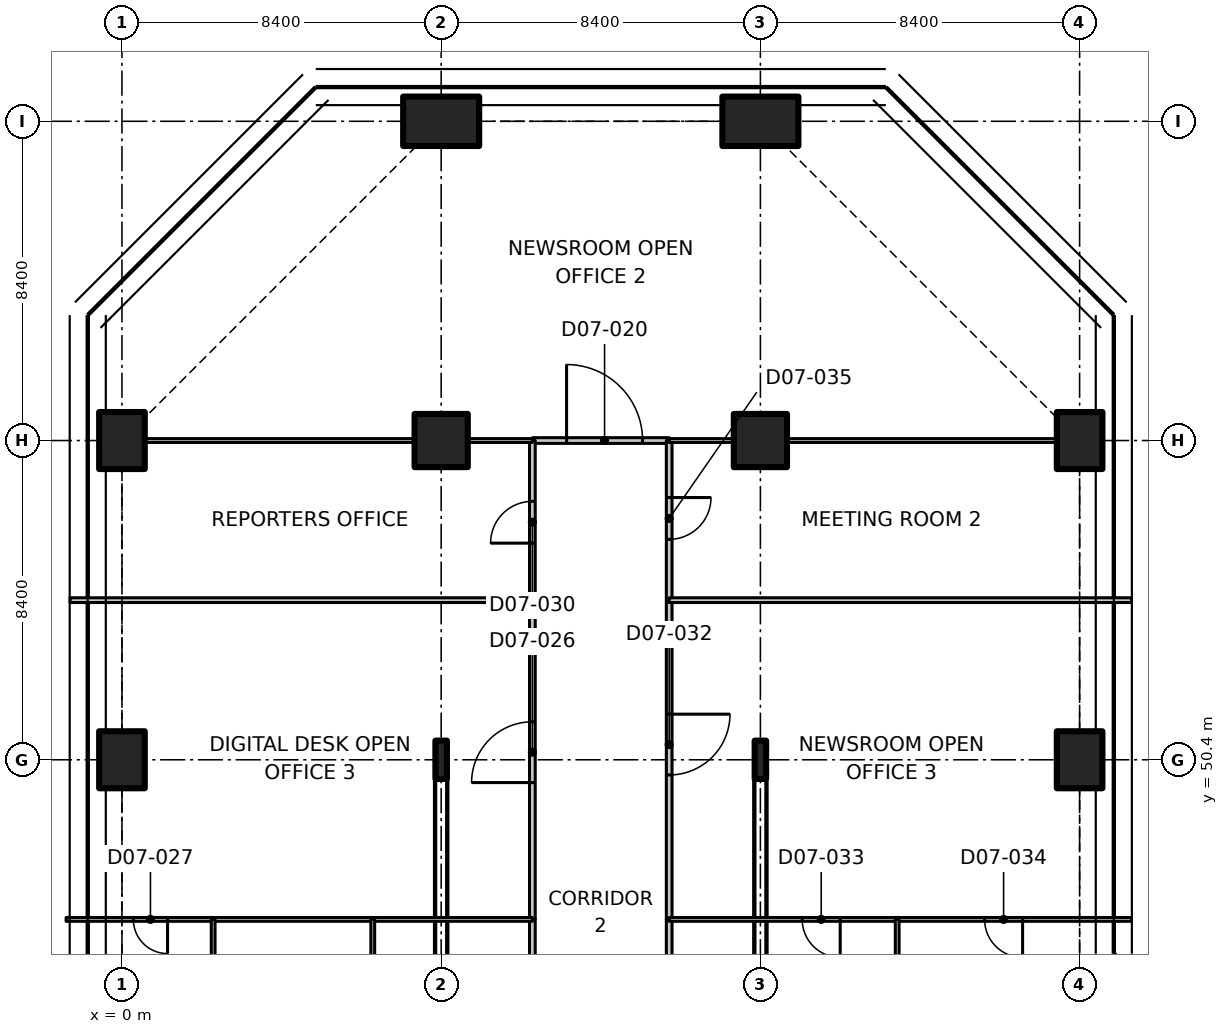
"""IFC4 building model, lengths in metres.
Left out: names, types, materials, properties, quantities, classifications, styles, units other than length and angle.
Written with IfcOpenShell. Run it as: python <this file> out.ifc"""

import sys

from ifc_helpers import new_model, si_unit, direction, frame, frame_2d, origin, origin_2d, place, context, subcontext, project, spatial, polyline, rectangle, i_section, outline, extrude, element, fill, save


model = new_model("IFC4")
c1 = context("Model", 3, precision=1e-05, world=origin(), true_north=direction((0.0, 1.0)))
c2 = subcontext(c1, "Body", "Model", "MODEL_VIEW")
j1 = project(units=[si_unit("LENGTHUNIT", "METRE"), si_unit("PLANEANGLEUNIT", "RADIAN")], contexts=[c1])
p1 = place(None, origin())
s1 = spatial("IfcSite", under=j1, at=p1, CompositionType="ELEMENT")
p2 = place(p1, origin())
s2 = spatial("IfcBuilding", under=s1, at=p2, CompositionType="ELEMENT")
p3 = place(p2, frame((0.0, 0.0, 40.1)))
s3 = spatial("IfcBuildingStorey", under=s2, at=p3, CompositionType="ELEMENT", Elevation=40.1)
for number, where, z_axis, x_axis in (
    (1, (0.0, 50.4, 0.0), (0.0, 0.0, 1.0), (1.0, 0.0, 0.0)),
    (2, (0.0, 58.8, 0.0), (0.0, 0.0, 1.0), (1.0, 0.0, 0.0)),
):
    element("IfcColumn", number, at=place(p3, frame(where, z_axis=z_axis, x_axis=x_axis)), inside=s3, PredefinedType="COLUMN", context=c2, shape_type="SweptSolid", body=[
        extrude(rectangle(XDim=1.2, YDim=1.5, at=origin_2d()), origin(), (0.0, 0.0, 1.0), 3.35),
    ])
p4 = place(p3, frame((8.4, 58.8, 0.0), z_axis=(0.0, 0.0, 1.0), x_axis=(1.0, 0.0, 0.0)))
e3 = element("IfcColumn", 3, at=p4, inside=s3, PredefinedType="COLUMN", context=c2, shape_type="SweptSolid", body=[
    extrude(rectangle(XDim=1.4, YDim=1.4, at=origin_2d()), origin(), (0.0, 0.0, 1.0), 3.35),
])
p5 = place(p3, frame((8.4, 67.2, 0.0), z_axis=(0.0, 0.0, 1.0), x_axis=(0.0, 1.0, 0.0)))
e4 = element("IfcColumn", 4, at=p5, inside=s3, PredefinedType="COLUMN", context=c2, shape_type="SweptSolid", body=[
    extrude(rectangle(XDim=1.3, YDim=2.0, at=origin_2d()), origin(), (0.0, 0.0, 1.0), 3.35),
])
p6 = place(p3, frame((16.8, 58.8, 0.0), z_axis=(0.0, 0.0, 1.0), x_axis=(1.0, 0.0, 0.0)))
e5 = element("IfcColumn", 5, at=p6, inside=s3, PredefinedType="COLUMN", context=c2, shape_type="SweptSolid", body=[
    extrude(rectangle(XDim=1.4, YDim=1.4, at=origin_2d()), origin(), (0.0, 0.0, 1.0), 3.35),
])
p7 = place(p3, frame((16.8, 67.2, 0.0), z_axis=(0.0, 0.0, 1.0), x_axis=(0.0, 1.0, 0.0)))
e6 = element("IfcColumn", 6, at=p7, inside=s3, PredefinedType="COLUMN", context=c2, shape_type="SweptSolid", body=[
    extrude(rectangle(XDim=1.3, YDim=2.0, at=origin_2d()), origin(), (0.0, 0.0, 1.0), 3.35),
])
for number, where, z_axis, x_axis in (
    (7, (25.2, 50.4, 0.0), (0.0, 0.0, 1.0), (1.0, 0.0, 0.0)),
    (8, (25.2, 58.8, 0.0), (0.0, 0.0, 1.0), (1.0, 0.0, 0.0)),
):
    element("IfcColumn", number, at=place(p3, frame(where, z_axis=z_axis, x_axis=x_axis)), inside=s3, PredefinedType="COLUMN", context=c2, shape_type="SweptSolid", body=[
        extrude(rectangle(XDim=1.2, YDim=1.5, at=origin_2d()), origin(), (0.0, 0.0, 1.0), 3.35),
    ])
for number, where, z_axis, x_axis in (
    (9, (8.4, 50.4, -0.125), (0.0, 0.0, 1.0), (1.0, 0.0, 0.0)),
    (10, (16.8, 50.4, -0.125), (0.0, 0.0, 1.0), (1.0, 0.0, 0.0)),
):
    element("IfcColumn", number, at=place(p3, frame(where, z_axis=z_axis, x_axis=x_axis)), inside=s3, PredefinedType="COLUMN", context=c2, shape_type="SweptSolid", body=[
        extrude(i_section(OverallWidth=0.302, OverallDepth=1.008, WebThickness=0.021, FlangeThickness=0.04, FilletRadius=0.03, at=origin_2d()), origin(), (0.0, 0.0, 1.0), 3.475),
    ])
p8 = place(p3, frame((10.8, 58.8, 0.0), z_axis=(0.0, 0.0, 1.0), x_axis=(1.0, 0.0, 0.0)))
e11 = element("IfcWall", 11, at=p8, inside=s3, PredefinedType="PARTITIONING", context=c2, shape_type="SweptSolid", body=[
    extrude(rectangle(XDim=3.6, YDim=0.15, at=frame_2d((1.8, 0.0))), origin(), (0.0, 0.0, 1.0), 3.33),
])
p9 = place(p8, frame((0.9, 0.0, 0.0)))
e12 = element("IfcOpeningElement", 12, at=p9, cuts=e11, PredefinedType="OPENING", context=c2, shape_type="SweptSolid", body=[
    extrude(rectangle(XDim=2.0, YDim=2.4, at=frame_2d((1.0, 1.2))), frame((0.0, 0.085, 0.0), z_axis=(0.0, -1.0, 0.0), x_axis=(1.0, 0.0, 0.0)), (0.0, 0.0, 1.0), 0.17),
])
p10 = place(p3, frame((10.8, 46.2, 0.0), z_axis=(0.0, 0.0, 1.0), x_axis=(0.0, 1.0, 0.0)))
e13 = element("IfcWall", 13, at=p10, inside=s3, PredefinedType="PARTITIONING", context=c2, shape_type="SweptSolid", body=[
    extrude(rectangle(XDim=8.4, YDim=0.15, at=frame_2d((4.2, 0.0))), origin(), (0.0, 0.0, 1.0), 3.33),
])
p11 = place(p10, frame((3.6, 0.0, 0.0)))
e14 = element("IfcOpeningElement", 14, at=p11, cuts=e13, PredefinedType="OPENING", context=c2, shape_type="SweptSolid", body=[
    extrude(rectangle(XDim=1.6, YDim=2.1, at=frame_2d((0.8, 1.05))), frame((0.0, 0.085, 0.0), z_axis=(0.0, -1.0, 0.0), x_axis=(1.0, 0.0, 0.0)), (0.0, 0.0, 1.0), 0.17),
])
p12 = place(p3, frame((10.8, 42.0, 0.0), z_axis=(0.0, 0.0, 1.0), x_axis=(0.0, 1.0, 0.0)))
e15 = element("IfcWall", 15, at=p12, inside=s3, PredefinedType="PARTITIONING", context=c2, shape_type="SweptSolid", body=[
    extrude(rectangle(XDim=4.2, YDim=0.15, at=frame_2d((2.1, 0.0))), origin(), (0.0, 0.0, 1.0), 3.33),
])
p13 = place(p3, frame((10.8, 54.6, 0.0), z_axis=(0.0, 0.0, 1.0), x_axis=(0.0, 1.0, 0.0)))
e16 = element("IfcWall", 16, at=p13, inside=s3, PredefinedType="PARTITIONING", context=c2, shape_type="SweptSolid", body=[
    extrude(rectangle(XDim=4.2, YDim=0.15, at=frame_2d((2.1, 0.0))), origin(), (0.0, 0.0, 1.0), 3.33),
])
p14 = place(p13, frame((1.5, 0.0, 0.0)))
e17 = element("IfcOpeningElement", 17, at=p14, cuts=e16, PredefinedType="OPENING", context=c2, shape_type="SweptSolid", body=[
    extrude(rectangle(XDim=1.1, YDim=2.1, at=frame_2d((0.55, 1.05))), frame((0.0, 0.085, 0.0), z_axis=(0.0, -1.0, 0.0), x_axis=(1.0, 0.0, 0.0)), (0.0, 0.0, 1.0), 0.17),
])
p15 = place(p3, frame((14.4, 54.6, 0.0), z_axis=(0.0, 0.0, 1.0), x_axis=(0.0, -1.0, 0.0)))
e18 = element("IfcWall", 18, at=p15, inside=s3, PredefinedType="PARTITIONING", context=c2, shape_type="SweptSolid", body=[
    extrude(rectangle(XDim=8.4, YDim=0.15, at=frame_2d((4.2, 0.0))), origin(), (0.0, 0.0, 1.0), 3.33),
])
p16 = place(p15, frame((3.0, 0.0, 0.0)))
e19 = element("IfcOpeningElement", 19, at=p16, cuts=e18, PredefinedType="OPENING", context=c2, shape_type="SweptSolid", body=[
    extrude(rectangle(XDim=1.6, YDim=2.1, at=frame_2d((0.8, 1.05))), frame((0.0, 0.085, 0.0), z_axis=(0.0, -1.0, 0.0), x_axis=(1.0, 0.0, 0.0)), (0.0, 0.0, 1.0), 0.17),
])
p17 = place(p3, frame((14.4, 46.2, 0.0), z_axis=(0.0, 0.0, 1.0), x_axis=(0.0, -1.0, 0.0)))
e20 = element("IfcWall", 20, at=p17, inside=s3, PredefinedType="PARTITIONING", context=c2, shape_type="SweptSolid", body=[
    extrude(rectangle(XDim=4.2, YDim=0.15, at=frame_2d((2.1, 0.0))), origin(), (0.0, 0.0, 1.0), 3.33),
])
p18 = place(p3, frame((14.4, 58.8, 0.0), z_axis=(0.0, 0.0, 1.0), x_axis=(0.0, -1.0, 0.0)))
e21 = element("IfcWall", 21, at=p18, inside=s3, PredefinedType="PARTITIONING", context=c2, shape_type="SweptSolid", body=[
    extrude(rectangle(XDim=4.2, YDim=0.15, at=frame_2d((2.1, 0.0))), origin(), (0.0, 0.0, 1.0), 3.33),
])
p19 = place(p18, frame((1.5, 0.0, 0.0)))
e22 = element("IfcOpeningElement", 22, at=p19, cuts=e21, PredefinedType="OPENING", context=c2, shape_type="SweptSolid", body=[
    extrude(rectangle(XDim=1.1, YDim=2.1, at=frame_2d((0.55, 1.05))), frame((0.0, 0.085, 0.0), z_axis=(0.0, -1.0, 0.0), x_axis=(1.0, 0.0, 0.0)), (0.0, 0.0, 1.0), 0.17),
])
p20 = place(p3, frame((10.8, 58.8, 0.0), z_axis=(0.0, 0.0, 1.0), x_axis=(-1.0, 0.0, 0.0)))
e23 = element("IfcWall", 23, at=p20, inside=s3, PredefinedType="PARTITIONING", context=c2, shape_type="SweptSolid", body=[
    extrude(rectangle(XDim=1.68, YDim=0.1, at=frame_2d((0.84, 0.0))), origin(), (0.0, 0.0, 1.0), 3.33),
])
p21 = place(p3, frame((7.68, 58.8, 0.0), z_axis=(0.0, 0.0, 1.0), x_axis=(-1.0, 0.0, 0.0)))
e24 = element("IfcWall", 24, at=p21, inside=s3, PredefinedType="PARTITIONING", context=c2, shape_type="SweptSolid", body=[
    extrude(rectangle(XDim=7.06, YDim=0.1, at=frame_2d((3.53, 0.0))), origin(), (0.0, 0.0, 1.0), 3.33),
])
p22 = place(p3, frame((24.58, 58.8, 0.0), z_axis=(0.0, 0.0, 1.0), x_axis=(-1.0, 0.0, 0.0)))
e25 = element("IfcWall", 25, at=p22, inside=s3, PredefinedType="PARTITIONING", context=c2, shape_type="SweptSolid", body=[
    extrude(rectangle(XDim=7.06, YDim=0.1, at=frame_2d((3.53, 0.0))), origin(), (0.0, 0.0, 1.0), 3.33),
])
p23 = place(p3, frame((16.08, 58.8, 0.0), z_axis=(0.0, 0.0, 1.0), x_axis=(-1.0, 0.0, 0.0)))
e26 = element("IfcWall", 26, at=p23, inside=s3, PredefinedType="PARTITIONING", context=c2, shape_type="SweptSolid", body=[
    extrude(rectangle(XDim=1.68, YDim=0.1, at=frame_2d((0.84, 0.0))), origin(), (0.0, 0.0, 1.0), 3.33),
])
p24 = place(p3, frame((2.4, 46.2, 0.0), z_axis=(0.0, 0.0, 1.0), x_axis=(-1.0, 0.0, 0.0)))
e27 = element("IfcWall", 27, at=p24, inside=s3, PredefinedType="PARTITIONING", context=c2, shape_type="SweptSolid", body=[
    extrude(rectangle(XDim=3.87, YDim=0.1, at=frame_2d((1.935, 0.0))), origin(), (0.0, 0.0, 1.0), 2.98),
])
p25 = place(p24, frame((1.2, 0.0, 0.0)))
e28 = element("IfcOpeningElement", 28, at=p25, cuts=e27, PredefinedType="OPENING", context=c2, shape_type="SweptSolid", body=[
    extrude(rectangle(XDim=0.9, YDim=2.1, at=frame_2d((0.45, 1.05))), frame((0.0, 0.06, 0.0), z_axis=(0.0, -1.0, 0.0), x_axis=(1.0, 0.0, 0.0)), (0.0, 0.0, 1.0), 0.12),
])
p26 = place(p3, frame((6.6, 46.2, 0.0), z_axis=(0.0, 0.0, 1.0), x_axis=(-1.0, 0.0, 0.0)))
e29 = element("IfcWall", 29, at=p26, inside=s3, PredefinedType="PARTITIONING", context=c2, shape_type="SweptSolid", body=[
    extrude(rectangle(XDim=4.2, YDim=0.1, at=frame_2d((2.1, 0.0))), origin(), (0.0, 0.0, 1.0), 3.33),
])
p27 = place(p3, frame((10.8, 46.2, 0.0), z_axis=(0.0, 0.0, 1.0), x_axis=(-1.0, 0.0, 0.0)))
e30 = element("IfcWall", 30, at=p27, inside=s3, PredefinedType="PARTITIONING", context=c2, shape_type="SweptSolid", body=[
    extrude(rectangle(XDim=4.2, YDim=0.1, at=frame_2d((2.1, 0.0))), origin(), (0.0, 0.0, 1.0), 3.33),
])
p28 = place(p3, frame((-1.365, 54.6, 0.0), z_axis=(0.0, 0.0, 1.0), x_axis=(1.0, 0.0, 0.0)))
e31 = element("IfcWall", 31, at=p28, inside=s3, PredefinedType="PARTITIONING", context=c2, shape_type="SweptSolid", body=[
    extrude(outline(polyline([(0.0, 0.0), (12.165, 0.0), (12.165, 3.33), (1.815, 3.33), (1.813, 2.98), (0.917, 2.98), (0.915, 3.33), (0.265, 3.33), (0.0, 3.33), (0.0, 0.0)])), frame((0.0, 0.062, 0.0), z_axis=(0.0, -1.0, 0.0), x_axis=(1.0, 0.0, 0.0)), (0.0, 0.0, 1.0), 0.125),
])
p29 = place(p3, frame((2.4, 46.2, 0.0), z_axis=(0.0, 0.0, 1.0), x_axis=(0.0, -1.0, 0.0)))
e32 = element("IfcWall", 32, at=p29, inside=s3, PredefinedType="PARTITIONING", context=c2, shape_type="SweptSolid", body=[
    extrude(rectangle(XDim=4.2, YDim=0.1, at=frame_2d((2.1, 0.0))), origin(), (0.0, 0.0, 1.0), 3.33),
])
p30 = place(p29, frame((1.8, 0.0, 0.0)))
e33 = element("IfcOpeningElement", 33, at=p30, cuts=e32, PredefinedType="OPENING", context=c2, shape_type="SweptSolid", body=[
    extrude(rectangle(XDim=0.9, YDim=2.1, at=frame_2d((0.45, 1.05))), frame((0.0, 0.06, 0.0), z_axis=(0.0, -1.0, 0.0), x_axis=(1.0, 0.0, 0.0)), (0.0, 0.0, 1.0), 0.12),
])
p31 = place(p3, frame((6.6, 46.2, 0.0), z_axis=(0.0, 0.0, 1.0), x_axis=(0.0, -1.0, 0.0)))
e34 = element("IfcWall", 34, at=p31, inside=s3, PredefinedType="PARTITIONING", context=c2, shape_type="SweptSolid", body=[
    extrude(rectangle(XDim=4.2, YDim=0.1, at=frame_2d((2.1, 0.0))), origin(), (0.0, 0.0, 1.0), 3.33),
])
p32 = place(p3, frame((20.4, 46.2, 0.0), z_axis=(0.0, 0.0, 1.0), x_axis=(-1.0, 0.0, 0.0)))
e35 = element("IfcWall", 35, at=p32, inside=s3, PredefinedType="PARTITIONING", context=c2, shape_type="SweptSolid", body=[
    extrude(rectangle(XDim=6.0, YDim=0.1, at=frame_2d((3.0, 0.0))), origin(), (0.0, 0.0, 1.0), 3.33),
])
p33 = place(p32, frame((1.5, 0.0, 0.0)))
e36 = element("IfcOpeningElement", 36, at=p33, cuts=e35, PredefinedType="OPENING", context=c2, shape_type="SweptSolid", body=[
    extrude(rectangle(XDim=1.0, YDim=2.1, at=frame_2d((0.5, 1.05))), frame((0.0, 0.06, 0.0), z_axis=(0.0, -1.0, 0.0), x_axis=(1.0, 0.0, 0.0)), (0.0, 0.0, 1.0), 0.12),
])
p34 = place(p3, frame((26.565, 46.2, 0.0), z_axis=(0.0, 0.0, 1.0), x_axis=(-1.0, 0.0, 0.0)))
e37 = element("IfcWall", 37, at=p34, inside=s3, PredefinedType="PARTITIONING", context=c2, shape_type="SweptSolid", body=[
    extrude(outline(polyline([(0.0, 0.0), (6.165, 0.0), (6.165, 3.33), (1.815, 3.33), (1.813, 2.98), (0.917, 2.98), (0.915, 3.33), (0.265, 3.33), (0.0, 3.33), (0.0, 0.0)])), frame((0.0, 0.05, 0.0), z_axis=(0.0, -1.0, 0.0), x_axis=(1.0, 0.0, 0.0)), (0.0, 0.0, 1.0), 0.1),
])
p35 = place(p34, frame((2.865, 0.0, 0.0)))
e38 = element("IfcOpeningElement", 38, at=p35, cuts=e37, PredefinedType="OPENING", context=c2, shape_type="SweptSolid", body=[
    extrude(rectangle(XDim=1.0, YDim=2.1, at=frame_2d((0.5, 1.05))), frame((0.0, 0.06, 0.0), z_axis=(0.0, -1.0, 0.0), x_axis=(1.0, 0.0, 0.0)), (0.0, 0.0, 1.0), 0.12),
])
p36 = place(p3, frame((14.4, 54.6, 0.0), z_axis=(0.0, 0.0, 1.0), x_axis=(1.0, 0.0, 0.0)))
e39 = element("IfcWall", 39, at=p36, inside=s3, PredefinedType="PARTITIONING", context=c2, shape_type="SweptSolid", body=[
    extrude(outline(polyline([(0.0, 0.0), (12.165, 0.0), (12.165, 3.33), (11.9, 3.33), (11.25, 3.33), (11.248, 2.98), (10.352, 2.98), (10.35, 3.33), (0.0, 3.33), (0.0, 0.0)])), frame((0.0, 0.062, 0.0), z_axis=(0.0, -1.0, 0.0), x_axis=(1.0, 0.0, 0.0)), (0.0, 0.0, 1.0), 0.125),
])
p37 = place(p3, frame((20.4, 46.2, 0.0), z_axis=(0.0, 0.0, 1.0), x_axis=(0.0, -1.0, 0.0)))
e40 = element("IfcWall", 40, at=p37, inside=s3, PredefinedType="PARTITIONING", context=c2, shape_type="SweptSolid", body=[
    extrude(rectangle(XDim=4.2, YDim=0.1, at=frame_2d((2.1, 0.0))), origin(), (0.0, 0.0, 1.0), 3.33),
])
p38 = place(p9, origin())
e41 = element("IfcDoor", 41, at=p38, inside=s3, OperationType="DOUBLE_DOOR_SINGLE_SWING", PredefinedType="DOOR", context=c2, shape_type="SweptSolid", body=[
    extrude(rectangle(XDim=2.0, YDim=2.4, at=frame_2d((1.0, 1.2))), frame((0.0, 0.025, 0.0), z_axis=(0.0, -1.0, 0.0), x_axis=(1.0, 0.0, 0.0)), (0.0, 0.0, 1.0), 0.05),
])
fill(e12, e41)
p39 = place(p11, origin())
e42 = element("IfcDoor", 42, at=p39, inside=s3, OperationType="DOUBLE_DOOR_SINGLE_SWING", PredefinedType="DOOR", context=c2, shape_type="SweptSolid", body=[
    extrude(rectangle(XDim=1.6, YDim=2.1, at=frame_2d((0.8, 1.05))), frame((0.0, 0.025, 0.0), z_axis=(0.0, -1.0, 0.0), x_axis=(1.0, 0.0, 0.0)), (0.0, 0.0, 1.0), 0.05),
])
fill(e14, e42)
p40 = place(p25, origin())
e43 = element("IfcDoor", 43, at=p40, inside=s3, OperationType="SINGLE_SWING_LEFT", PredefinedType="DOOR", context=c2, shape_type="SweptSolid", body=[
    extrude(rectangle(XDim=0.9, YDim=2.1, at=frame_2d((0.45, 1.05))), frame((0.0, 0.025, 0.0), z_axis=(0.0, -1.0, 0.0), x_axis=(1.0, 0.0, 0.0)), (0.0, 0.0, 1.0), 0.05),
])
fill(e28, e43)
p41 = place(p14, origin())
e44 = element("IfcDoor", 44, at=p41, inside=s3, OperationType="SINGLE_SWING_LEFT", PredefinedType="DOOR", context=c2, shape_type="SweptSolid", body=[
    extrude(rectangle(XDim=1.1, YDim=2.1, at=frame_2d((0.55, 1.05))), frame((0.0, 0.025, 0.0), z_axis=(0.0, -1.0, 0.0), x_axis=(1.0, 0.0, 0.0)), (0.0, 0.0, 1.0), 0.05),
])
fill(e17, e44)
p42 = place(p16, origin())
e45 = element("IfcDoor", 45, at=p42, inside=s3, OperationType="DOUBLE_DOOR_SINGLE_SWING", PredefinedType="DOOR", context=c2, shape_type="SweptSolid", body=[
    extrude(rectangle(XDim=1.6, YDim=2.1, at=frame_2d((0.8, 1.05))), frame((0.0, 0.025, 0.0), z_axis=(0.0, -1.0, 0.0), x_axis=(1.0, 0.0, 0.0)), (0.0, 0.0, 1.0), 0.05),
])
fill(e19, e45)
p43 = place(p33, origin())
e46 = element("IfcDoor", 46, at=p43, inside=s3, OperationType="SINGLE_SWING_LEFT", PredefinedType="DOOR", context=c2, shape_type="SweptSolid", body=[
    extrude(rectangle(XDim=1.0, YDim=2.1, at=frame_2d((0.5, 1.05))), frame((0.0, 0.025, 0.0), z_axis=(0.0, -1.0, 0.0), x_axis=(1.0, 0.0, 0.0)), (0.0, 0.0, 1.0), 0.05),
])
fill(e36, e46)
p44 = place(p35, origin())
e47 = element("IfcDoor", 47, at=p44, inside=s3, OperationType="SINGLE_SWING_LEFT", PredefinedType="DOOR", context=c2, shape_type="SweptSolid", body=[
    extrude(rectangle(XDim=1.0, YDim=2.1, at=frame_2d((0.5, 1.05))), frame((0.0, 0.025, 0.0), z_axis=(0.0, -1.0, 0.0), x_axis=(1.0, 0.0, 0.0)), (0.0, 0.0, 1.0), 0.05),
])
fill(e38, e47)
p45 = place(p19, origin())
e48 = element("IfcDoor", 48, at=p45, inside=s3, OperationType="SINGLE_SWING_LEFT", PredefinedType="DOOR", context=c2, shape_type="SweptSolid", body=[
    extrude(rectangle(XDim=1.1, YDim=2.1, at=frame_2d((0.55, 1.05))), frame((0.0, 0.025, 0.0), z_axis=(0.0, -1.0, 0.0), x_axis=(1.0, 0.0, 0.0)), (0.0, 0.0, 1.0), 0.05),
])
fill(e22, e48)
save(model, sys.argv[1])
